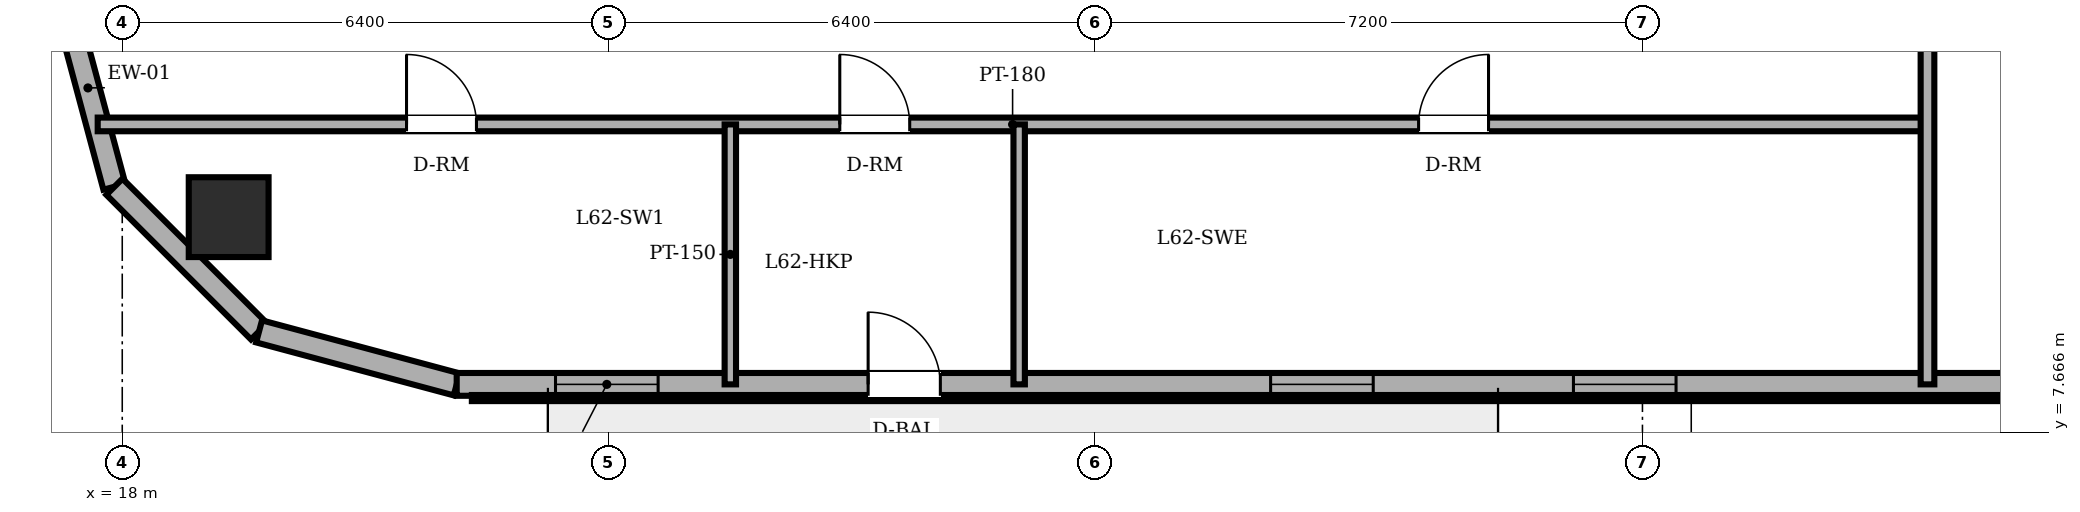
"""IFC4 building model, lengths in metres.
Left out: names, types, materials, properties, quantities, classifications, styles, units other than length and angle.
Written with IfcOpenShell. Run it as: python <this file> out.ifc"""

import sys

from ifc_helpers import new_model, si_unit, direction, frame, frame_2d, origin, origin_2d, place, context, subcontext, project, spatial, rectangle, circle, extrude, element, fill, save


model = new_model("IFC4")
c1 = context("Model", 3, precision=1e-05, world=origin(), true_north=direction((0.0, 1.0)))
c2 = subcontext(c1, "Body", "Model", "MODEL_VIEW")
j1 = project(units=[si_unit("LENGTHUNIT", "METRE"), si_unit("PLANEANGLEUNIT", "RADIAN")], contexts=[c1])
p1 = place(None, origin())
s1 = spatial("IfcSite", under=j1, at=p1, CompositionType="ELEMENT")
p2 = place(p1, origin())
s2 = spatial("IfcBuilding", under=s1, at=p2, CompositionType="ELEMENT")
p3 = place(p2, frame((0.0, 0.0, 237.3)))
s3 = spatial("IfcBuildingStorey", under=s2, at=p3, CompositionType="ELEMENT", Elevation=237.3)
p4 = place(p3, frame((19.4, 10.5, 0.0), z_axis=(0.0, 0.0, 1.0), x_axis=(1.0, 0.0, 0.0)))
e1 = element("IfcColumn", 1, at=p4, inside=s3, PredefinedType="COLUMN", context=c2, shape_type="SweptSolid", body=[
    extrude(circle(Radius=0.525, at=origin_2d()), origin(), (0.0, 0.0, 1.0), 3.6),
])
p5 = place(p3, frame((17.2, 13.5, 0.0), z_axis=(0.0, 0.0, 1.0), x_axis=(0.258932525951, -0.965895412042, 0.0)))
e2 = element("IfcWall", 2, at=p5, inside=s3, PredefinedType="SOLIDWALL", context=c2, shape_type="SweptSolid", body=[
    extrude(rectangle(XDim=2.692, YDim=0.3, at=frame_2d((1.346, 0.0))), origin(), (0.0, 0.0, 1.0), 3.4),
])
p6 = place(p3, frame((17.897, 10.9, 0.0), z_axis=(0.0, 0.0, 1.0), x_axis=(0.707152139074, -0.70706142039, 0.0)))
e3 = element("IfcWall", 3, at=p6, inside=s3, PredefinedType="SOLIDWALL", context=c2, shape_type="SweptSolid", body=[
    extrude(rectangle(XDim=2.691, YDim=0.3, at=frame_2d((1.346, 0.0))), origin(), (0.0, 0.0, 1.0), 3.4),
])
p7 = place(p3, frame((19.8, 8.997, 0.0), z_axis=(0.0, 0.0, 1.0), x_axis=(0.965889330541, -0.258955210695, 0.0)))
e4 = element("IfcWall", 4, at=p7, inside=s3, PredefinedType="SOLIDWALL", context=c2, shape_type="SweptSolid", body=[
    extrude(rectangle(XDim=2.692, YDim=0.3, at=frame_2d((1.346, 0.0))), origin(), (0.0, 0.0, 1.0), 3.4),
])
p8 = place(p3, frame((22.4, 8.3, 0.0), z_axis=(0.0, 0.0, 1.0), x_axis=(1.0, 0.0, 0.0)))
e5 = element("IfcWall", 5, at=p8, inside=s3, PredefinedType="SOLIDWALL", context=c2, shape_type="SweptSolid", body=[
    extrude(rectangle(XDim=32.485, YDim=0.3, at=frame_2d((16.243, 0.0))), origin(), (0.0, 0.0, 1.0), 3.4),
])
p9 = place(p8, frame((5.413, 0.0, 0.0)))
e6 = element("IfcOpeningElement", 6, at=p9, cuts=e5, PredefinedType="OPENING", context=c2, shape_type="SweptSolid", body=[
    extrude(rectangle(XDim=0.95, YDim=2.2, at=frame_2d((0.475, 1.1))), frame((0.0, 0.16, 0.0), z_axis=(0.0, -1.0, 0.0), x_axis=(1.0, 0.0, 0.0)), (0.0, 0.0, 1.0), 0.32),
])
p10 = place(p8, frame((1.3, 0.0, 0.85)))
e7 = element("IfcOpeningElement", 7, at=p10, cuts=e5, PredefinedType="OPENING", context=c2, shape_type="SweptSolid", body=[
    extrude(rectangle(XDim=1.35, YDim=1.55, at=frame_2d((0.675, 0.775))), frame((0.0, 0.16, 0.0), z_axis=(0.0, -1.0, 0.0), x_axis=(1.0, 0.0, 0.0)), (0.0, 0.0, 1.0), 0.32),
])
p11 = place(p8, frame((10.708, 0.0, 0.85)))
e8 = element("IfcOpeningElement", 8, at=p11, cuts=e5, PredefinedType="OPENING", context=c2, shape_type="SweptSolid", body=[
    extrude(rectangle(XDim=1.35, YDim=1.55, at=frame_2d((0.675, 0.775))), frame((0.0, 0.16, 0.0), z_axis=(0.0, -1.0, 0.0), x_axis=(1.0, 0.0, 0.0)), (0.0, 0.0, 1.0), 0.32),
])
p12 = place(p8, frame((14.692, 0.0, 0.85)))
e9 = element("IfcOpeningElement", 9, at=p12, cuts=e5, PredefinedType="OPENING", context=c2, shape_type="SweptSolid", body=[
    extrude(rectangle(XDim=1.35, YDim=1.55, at=frame_2d((0.675, 0.775))), frame((0.0, 0.16, 0.0), z_axis=(0.0, -1.0, 0.0), x_axis=(1.0, 0.0, 0.0)), (0.0, 0.0, 1.0), 0.32),
])
p13 = place(p8, frame((22.937, 0.0, 0.85)))
e10 = element("IfcOpeningElement", 10, at=p13, cuts=e5, PredefinedType="OPENING", context=c2, shape_type="SweptSolid", body=[
    extrude(rectangle(XDim=1.35, YDim=1.55, at=frame_2d((0.675, 0.775))), frame((0.0, 0.16, 0.0), z_axis=(0.0, -1.0, 0.0), x_axis=(1.0, 0.0, 0.0)), (0.0, 0.0, 1.0), 0.32),
])
p14 = place(p8, frame((27.198, 0.0, 0.85)))
e11 = element("IfcOpeningElement", 11, at=p14, cuts=e5, PredefinedType="OPENING", context=c2, shape_type="SweptSolid", body=[
    extrude(rectangle(XDim=1.35, YDim=1.55, at=frame_2d((0.675, 0.775))), frame((0.0, 0.16, 0.0), z_axis=(0.0, -1.0, 0.0), x_axis=(1.0, 0.0, 0.0)), (0.0, 0.0, 1.0), 0.32),
])
p15 = place(p3, frame((17.677, 11.72, 0.0), z_axis=(0.0, 0.0, 1.0), x_axis=(1.0, 0.0, 0.0)))
e12 = element("IfcWall", 12, at=p15, inside=s3, PredefinedType="PARTITIONING", context=c2, shape_type="SweptSolid", body=[
    extrude(rectangle(XDim=24.073, YDim=0.18, at=frame_2d((12.037, 0.0))), origin(), (0.0, 0.0, 1.0), 3.4),
])
p16 = place(p15, frame((9.763, 0.0, 0.0)))
e13 = element("IfcOpeningElement", 13, at=p16, cuts=e12, PredefinedType="OPENING", context=c2, shape_type="SweptSolid", body=[
    extrude(rectangle(XDim=0.92, YDim=2.1, at=frame_2d((0.46, 1.05))), frame((0.0, 0.1, 0.0), z_axis=(0.0, -1.0, 0.0), x_axis=(1.0, 0.0, 0.0)), (0.0, 0.0, 1.0), 0.2),
])
p17 = place(p15, frame((4.063, 0.0, 0.0)))
e14 = element("IfcOpeningElement", 14, at=p17, cuts=e12, PredefinedType="OPENING", context=c2, shape_type="SweptSolid", body=[
    extrude(rectangle(XDim=0.92, YDim=2.1, at=frame_2d((0.46, 1.05))), frame((0.0, 0.1, 0.0), z_axis=(0.0, -1.0, 0.0), x_axis=(1.0, 0.0, 0.0)), (0.0, 0.0, 1.0), 0.2),
])
p18 = place(p15, frame((17.378, 0.0, 0.0)))
e15 = element("IfcOpeningElement", 15, at=p18, cuts=e12, PredefinedType="OPENING", context=c2, shape_type="SweptSolid", body=[
    extrude(rectangle(XDim=0.92, YDim=2.1, at=frame_2d((0.46, 1.05))), frame((0.0, 0.1, 0.0), z_axis=(0.0, -1.0, 0.0), x_axis=(1.0, 0.0, 0.0)), (0.0, 0.0, 1.0), 0.2),
])
for number, where, z_axis, x_axis in (
    (16, (26.0, 8.3, 0.0), (0.0, 0.0, 1.0), (0.0, 1.0, 0.0)),
    (17, (29.8, 8.3, 0.0), (0.0, 0.0, 1.0), (0.0, 1.0, 0.0)),
):
    element("IfcWall", number, at=place(p3, frame(where, z_axis=z_axis, x_axis=x_axis)), inside=s3, PredefinedType="PARTITIONING", context=c2, shape_type="SweptSolid", body=[
        extrude(rectangle(XDim=3.42, YDim=0.15, at=frame_2d((1.71, 0.0))), origin(), (0.0, 0.0, 1.0), 3.4),
    ])
p19 = place(p3, frame((41.75, 8.3, 0.0), z_axis=(0.0, 0.0, 1.0), x_axis=(0.0, 1.0, 0.0)))
e18 = element("IfcWall", 18, at=p19, inside=s3, PredefinedType="PARTITIONING", context=c2, shape_type="SweptSolid", body=[
    extrude(rectangle(XDim=14.52, YDim=0.18, at=frame_2d((7.26, 0.0))), origin(), (0.0, 0.0, 1.0), 3.4),
])
p20 = place(p9, origin())
e19 = element("IfcDoor", 19, at=p20, inside=s3, OperationType="SINGLE_SWING_LEFT", PredefinedType="DOOR", context=c2, shape_type="SweptSolid", body=[
    extrude(rectangle(XDim=0.95, YDim=2.2, at=frame_2d((0.475, 1.1))), frame((0.0, 0.025, 0.0), z_axis=(0.0, -1.0, 0.0), x_axis=(1.0, 0.0, 0.0)), (0.0, 0.0, 1.0), 0.05),
])
fill(e6, e19)
p21 = place(p10, origin())
e20 = element("IfcWindow", 20, at=p21, inside=s3, PartitioningType="SINGLE_PANEL", PredefinedType="WINDOW", context=c2, shape_type="SweptSolid", body=[
    extrude(rectangle(XDim=1.35, YDim=1.55, at=frame_2d((0.675, 0.775))), frame((0.0, 0.03, 0.0), z_axis=(0.0, -1.0, 0.0), x_axis=(1.0, 0.0, 0.0)), (0.0, 0.0, 1.0), 0.06),
])
fill(e7, e20)
p22 = place(p11, origin())
e21 = element("IfcWindow", 21, at=p22, inside=s3, PartitioningType="SINGLE_PANEL", PredefinedType="WINDOW", context=c2, shape_type="SweptSolid", body=[
    extrude(rectangle(XDim=1.35, YDim=1.55, at=frame_2d((0.675, 0.775))), frame((0.0, 0.03, 0.0), z_axis=(0.0, -1.0, 0.0), x_axis=(1.0, 0.0, 0.0)), (0.0, 0.0, 1.0), 0.06),
])
fill(e8, e21)
p23 = place(p12, origin())
e22 = element("IfcWindow", 22, at=p23, inside=s3, PartitioningType="SINGLE_PANEL", PredefinedType="WINDOW", context=c2, shape_type="SweptSolid", body=[
    extrude(rectangle(XDim=1.35, YDim=1.55, at=frame_2d((0.675, 0.775))), frame((0.0, 0.03, 0.0), z_axis=(0.0, -1.0, 0.0), x_axis=(1.0, 0.0, 0.0)), (0.0, 0.0, 1.0), 0.06),
])
fill(e9, e22)
p24 = place(p16, origin())
e23 = element("IfcDoor", 23, at=p24, inside=s3, OperationType="SINGLE_SWING_LEFT", PredefinedType="DOOR", context=c2, shape_type="SweptSolid", body=[
    extrude(rectangle(XDim=0.92, YDim=2.1, at=frame_2d((0.46, 1.05))), frame((0.0, 0.025, 0.0), z_axis=(0.0, -1.0, 0.0), x_axis=(1.0, 0.0, 0.0)), (0.0, 0.0, 1.0), 0.05),
])
fill(e13, e23)
p25 = place(p17, origin())
e24 = element("IfcDoor", 24, at=p25, inside=s3, OperationType="SINGLE_SWING_LEFT", PredefinedType="DOOR", context=c2, shape_type="SweptSolid", body=[
    extrude(rectangle(XDim=0.92, YDim=2.1, at=frame_2d((0.46, 1.05))), frame((0.0, 0.025, 0.0), z_axis=(0.0, -1.0, 0.0), x_axis=(1.0, 0.0, 0.0)), (0.0, 0.0, 1.0), 0.05),
])
fill(e14, e24)
p26 = place(p18, origin())
e25 = element("IfcDoor", 25, at=p26, inside=s3, OperationType="SINGLE_SWING_RIGHT", PredefinedType="DOOR", context=c2, shape_type="SweptSolid", body=[
    extrude(rectangle(XDim=0.92, YDim=2.1, at=frame_2d((0.46, 1.05))), frame((0.0, 0.025, 0.0), z_axis=(0.0, -1.0, 0.0), x_axis=(1.0, 0.0, 0.0)), (0.0, 0.0, 1.0), 0.05),
])
fill(e15, e25)
save(model, sys.argv[1])
